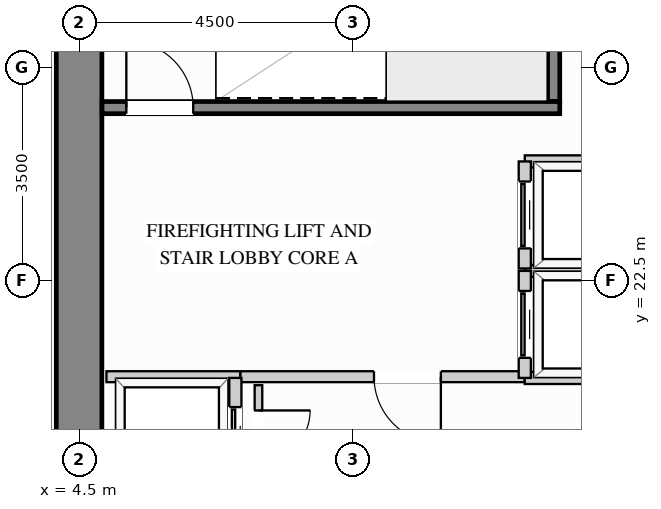
"""IFC4 building model, lengths in metres.
Left out: names, types, materials, properties, quantities, classifications, styles, units other than length and angle.
Written with IfcOpenShell. Run it as: python <this file> out.ifc"""

import sys

from ifc_helpers import new_model, si_unit, direction, frame, frame_2d, origin, place, context, subcontext, project, spatial, rectangle, extrude, source, transform, mapped, element, fill, save


model = new_model("IFC4")
c1 = context("Model", 3, precision=1e-05, world=origin(), true_north=direction((0.0, 1.0)))
c2 = subcontext(c1, "Body", "Model", "MODEL_VIEW")
j1 = project(units=[si_unit("LENGTHUNIT", "METRE"), si_unit("PLANEANGLEUNIT", "RADIAN")], contexts=[c1])
p1 = place(None, origin())
s1 = spatial("IfcSite", under=j1, at=p1, CompositionType="ELEMENT")
p2 = place(p1, origin())
s2 = spatial("IfcBuilding", under=s1, at=p2, CompositionType="ELEMENT")
p3 = place(p2, frame((0.0, 0.0, 77.4)))
s3 = spatial("IfcBuildingStorey", under=s2, at=p3, CompositionType="ELEMENT", Elevation=77.4)
m1 = source(origin(), c2, "Body", "SweptSolid", [
    extrude(rectangle(XDim=20.25, YDim=0.75, at=frame_2d((10.125, 0.0))), origin(), (0.0, 0.0, 1.0), 3.38),
])
p4 = place(p3, frame((4.5, 8.875, 0.0), z_axis=(0.0, 0.0, 1.0), x_axis=(0.0, 1.0, 0.0)))
e1 = element("IfcWall", 1, at=p4, inside=s3, PredefinedType="SHEAR", context=c2, shape_type="MappedRepresentation", body=[
    mapped(m1, transform((0.0, 0.0, 0.0), x_axis=(1.0, 0.0, 0.0), y_axis=(0.0, 1.0, 0.0), z_axis=(0.0, 0.0, 1.0))),
])
p5 = place(p3, frame((7.15, 20.92, 0.0), z_axis=(0.0, 0.0, 1.0), x_axis=(1.0, 0.0, 0.0)))
e2 = element("IfcWall", 2, at=p5, inside=s3, PredefinedType="PARTITIONING", context=c2, shape_type="SweptSolid", body=[
    extrude(rectangle(XDim=4.68, YDim=0.18, at=frame_2d((2.34, 0.0))), origin(), (0.0, 0.0, 1.0), 3.365),
])
p6 = place(p5, frame((2.2, 0.0, 0.0)))
e3 = element("IfcOpeningElement", 3, at=p6, cuts=e2, PredefinedType="OPENING", context=c2, shape_type="SweptSolid", body=[
    extrude(rectangle(XDim=1.1, YDim=2.15, at=frame_2d((0.55, 1.075))), frame((0.0, 0.1, 0.0), z_axis=(0.0, -1.0, 0.0), x_axis=(1.0, 0.0, 0.0)), (0.0, 0.0, 1.0), 0.2),
])
m2 = source(origin(), c2, "Body", "SweptSolid", [
    extrude(rectangle(XDim=2.2, YDim=0.18, at=frame_2d((1.1, 0.0))), origin(), (0.0, 0.0, 1.0), 3.365),
])
p7 = place(p3, frame((4.95, 20.92, 0.0), z_axis=(0.0, 0.0, 1.0), x_axis=(1.0, 0.0, 0.0)))
e4 = element("IfcWall", 4, at=p7, inside=s3, PredefinedType="PARTITIONING", context=c2, shape_type="MappedRepresentation", body=[
    mapped(m2, transform((0.0, 0.0, 0.0), x_axis=(1.0, 0.0, 0.0), y_axis=(0.0, 1.0, 0.0), z_axis=(0.0, 0.0, 1.0))),
])
p8 = place(p3, frame((7.45, 19.2, 0.0), z_axis=(0.0, 0.0, 1.0), x_axis=(0.0, 1.0, 0.0)))
e5 = element("IfcWall", 5, at=p8, inside=s3, PredefinedType="PARTITIONING", context=c2, shape_type="SweptSolid", body=[
    extrude(rectangle(XDim=1.58, YDim=0.125, at=frame_2d((0.79, 0.0))), origin(), (0.0, 0.0, 1.0), 3.365),
])
p9 = place(p8, frame((0.315, 0.0, 0.0)))
e6 = element("IfcOpeningElement", 6, at=p9, cuts=e5, PredefinedType="OPENING", context=c2, shape_type="SweptSolid", body=[
    extrude(rectangle(XDim=0.85, YDim=2.1, at=frame_2d((0.425, 1.05))), frame((0.0, 0.073, 0.0), z_axis=(0.0, -1.0, 0.0), x_axis=(1.0, 0.0, 0.0)), (0.0, 0.0, 1.0), 0.145),
])
m3 = source(origin(), c2, "Body", "SweptSolid", [
    extrude(rectangle(XDim=2.265, YDim=0.2, at=frame_2d((1.132, 0.0))), origin(), (0.0, 0.0, 1.0), 3.365),
])
for number, where, z_axis, x_axis in (
    (7, (11.83, 22.66, 0.0), (0.0, 0.0, 1.0), (1.0, 0.0, 0.0)),
    (8, (11.83, 20.9, 0.0), (0.0, 0.0, 1.0), (1.0, 0.0, 0.0)),
):
    element("IfcWall", number, at=place(p3, frame(where, z_axis=z_axis, x_axis=x_axis)), inside=s3, PredefinedType="PARTITIONING", context=c2, shape_type="MappedRepresentation", body=[
        mapped(m3, transform((0.0, 0.0, 0.0), x_axis=(1.0, 0.0, 0.0), y_axis=(0.0, 1.0, 0.0), z_axis=(0.0, 0.0, 1.0))),
    ])
p10 = place(p3, frame((11.83, 20.9, 0.0), z_axis=(0.0, 0.0, 1.0), x_axis=(0.0, 1.0, 0.0)))
e9 = element("IfcWall", 9, at=p10, inside=s3, PredefinedType="PARTITIONING", context=c2, shape_type="SweptSolid", body=[
    extrude(rectangle(XDim=1.76, YDim=0.2, at=frame_2d((0.88, 0.0))), origin(), (0.0, 0.0, 1.0), 3.365),
])
p11 = place(p10, frame((0.33, 0.0, 0.0)))
e10 = element("IfcOpeningElement", 10, at=p11, cuts=e9, PredefinedType="OPENING", context=c2, shape_type="SweptSolid", body=[
    extrude(rectangle(XDim=1.1, YDim=2.2, at=frame_2d((0.55, 1.1))), frame((0.0, 0.11, 0.0), z_axis=(0.0, -1.0, 0.0), x_axis=(1.0, 0.0, 0.0)), (0.0, 0.0, 1.0), 0.22),
])
p12 = place(p3, frame((11.83, 24.46, 0.0), z_axis=(0.0, 0.0, 1.0), x_axis=(1.0, 0.0, 0.0)))
e11 = element("IfcWall", 11, at=p12, inside=s3, PredefinedType="PARTITIONING", context=c2, shape_type="MappedRepresentation", body=[
    mapped(m3, transform((0.0, 0.0, 0.0), x_axis=(1.0, 0.0, 0.0), y_axis=(0.0, 1.0, 0.0), z_axis=(0.0, 0.0, 1.0))),
])
p13 = place(p3, frame((11.83, 22.7, 0.0), z_axis=(0.0, 0.0, 1.0), x_axis=(0.0, 1.0, 0.0)))
e12 = element("IfcWall", 12, at=p13, inside=s3, PredefinedType="PARTITIONING", context=c2, shape_type="SweptSolid", body=[
    extrude(rectangle(XDim=1.76, YDim=0.2, at=frame_2d((0.88, 0.0))), origin(), (0.0, 0.0, 1.0), 3.365),
])
p14 = place(p13, frame((0.33, 0.0, 0.0)))
e13 = element("IfcOpeningElement", 13, at=p14, cuts=e12, PredefinedType="OPENING", context=c2, shape_type="SweptSolid", body=[
    extrude(rectangle(XDim=1.1, YDim=2.2, at=frame_2d((0.55, 1.1))), frame((0.0, 0.11, 0.0), z_axis=(0.0, -1.0, 0.0), x_axis=(1.0, 0.0, 0.0)), (0.0, 0.0, 1.0), 0.22),
])
p15 = place(p3, frame((7.07, 18.84, 0.0), z_axis=(0.0, 0.0, 1.0), x_axis=(0.0, 1.0, 0.0)))
e14 = element("IfcWall", 14, at=p15, inside=s3, PredefinedType="PARTITIONING", context=c2, shape_type="SweptSolid", body=[
    extrude(rectangle(XDim=2.06, YDim=0.2, at=frame_2d((1.03, 0.0))), origin(), (0.0, 0.0, 1.0), 3.365),
])
p16 = place(p15, frame((0.48, 0.0, 0.0)))
e15 = element("IfcOpeningElement", 15, at=p16, cuts=e14, PredefinedType="OPENING", context=c2, shape_type="SweptSolid", body=[
    extrude(rectangle(XDim=1.1, YDim=2.2, at=frame_2d((0.55, 1.1))), frame((0.0, 0.11, 0.0), z_axis=(0.0, -1.0, 0.0), x_axis=(1.0, 0.0, 0.0)), (0.0, 0.0, 1.0), 0.22),
])
m4 = source(origin(), c2, "Body", "SweptSolid", [
    extrude(rectangle(XDim=3.678, YDim=0.2, at=frame_2d((1.839, 0.0))), origin(), (0.0, 0.0, 1.0), 3.38),
])
p17 = place(p3, frame((12.305, 25.445, 0.0), z_axis=(0.0, 0.0, 1.0), x_axis=(0.0, 1.0, 0.0)))
e16 = element("IfcWall", 16, at=p17, inside=s3, PredefinedType="SHEAR", context=c2, shape_type="MappedRepresentation", body=[
    mapped(m4, transform((0.0, 0.0, 0.0), x_axis=(1.0, 0.0, 0.0), y_axis=(0.0, 1.0, 0.0), z_axis=(0.0, 0.0, 1.0))),
])
p18 = place(p3, frame((4.877, 25.345, 0.0), z_axis=(0.0, 0.0, 1.0), x_axis=(1.0, 0.0, 0.0)))
e17 = element("IfcWall", 17, at=p18, inside=s3, PredefinedType="SHEAR", context=c2, shape_type="SweptSolid", body=[
    extrude(rectangle(XDim=7.528, YDim=0.2, at=frame_2d((3.764, 0.0))), origin(), (0.0, 0.0, 1.0), 3.38),
])
p19 = place(p18, frame((0.4, 0.0, 0.0)))
e18 = element("IfcOpeningElement", 18, at=p19, cuts=e17, PredefinedType="OPENING", context=c2, shape_type="SweptSolid", body=[
    extrude(rectangle(XDim=1.1, YDim=2.15, at=frame_2d((0.55, 1.075))), frame((0.0, 0.11, 0.0), z_axis=(0.0, -1.0, 0.0), x_axis=(1.0, 0.0, 0.0)), (0.0, 0.0, 1.0), 0.22),
])
m5 = source(origin(), c2, "Body", "SweptSolid", [
    extrude(rectangle(XDim=1.1, YDim=2.15, at=frame_2d((0.55, 1.075))), frame((0.0, 0.025, 0.0), z_axis=(0.0, -1.0, 0.0), x_axis=(1.0, 0.0, 0.0)), (0.0, 0.0, 1.0), 0.05),
])
p20 = place(p6, origin())
e19 = element("IfcDoor", 19, at=p20, inside=s3, OperationType="SINGLE_SWING_RIGHT", PredefinedType="DOOR", context=c2, shape_type="MappedRepresentation", body=[
    mapped(m5, transform((0.0, 0.0, 0.0), x_axis=(1.0, 0.0, 0.0), y_axis=(0.0, 1.0, 0.0), z_axis=(0.0, 0.0, 1.0))),
])
fill(e3, e19)
m6 = source(origin(), c2, "Body", "SweptSolid", [
    extrude(rectangle(XDim=1.1, YDim=2.2, at=frame_2d((0.55, 1.1))), frame((0.0, 0.025, 0.0), z_axis=(0.0, -1.0, 0.0), x_axis=(1.0, 0.0, 0.0)), (0.0, 0.0, 1.0), 0.05),
])
p21 = place(p11, origin())
e20 = element("IfcDoor", 20, at=p21, inside=s3, OperationType="SLIDING_TO_LEFT", PredefinedType="DOOR", context=c2, shape_type="MappedRepresentation", body=[
    mapped(m6, transform((0.0, 0.0, 0.0), x_axis=(1.0, 0.0, 0.0), y_axis=(0.0, 1.0, 0.0), z_axis=(0.0, 0.0, 1.0))),
])
fill(e10, e20)
p22 = place(p14, origin())
e21 = element("IfcDoor", 21, at=p22, inside=s3, OperationType="SLIDING_TO_LEFT", PredefinedType="DOOR", context=c2, shape_type="MappedRepresentation", body=[
    mapped(m6, transform((0.0, 0.0, 0.0), x_axis=(1.0, 0.0, 0.0), y_axis=(0.0, 1.0, 0.0), z_axis=(0.0, 0.0, 1.0))),
])
fill(e13, e21)
p23 = place(p16, origin())
e22 = element("IfcDoor", 22, at=p23, inside=s3, OperationType="SLIDING_TO_LEFT", PredefinedType="DOOR", context=c2, shape_type="MappedRepresentation", body=[
    mapped(m6, transform((0.0, 0.0, 0.0), x_axis=(1.0, 0.0, 0.0), y_axis=(0.0, 1.0, 0.0), z_axis=(0.0, 0.0, 1.0))),
])
fill(e15, e22)
m7 = source(origin(), c2, "Body", "SweptSolid", [
    extrude(rectangle(XDim=0.85, YDim=2.1, at=frame_2d((0.425, 1.05))), frame((0.0, 0.025, 0.0), z_axis=(0.0, -1.0, 0.0), x_axis=(1.0, 0.0, 0.0)), (0.0, 0.0, 1.0), 0.05),
])
p24 = place(p9, origin())
e23 = element("IfcDoor", 23, at=p24, inside=s3, OperationType="SINGLE_SWING_RIGHT", PredefinedType="DOOR", context=c2, shape_type="MappedRepresentation", body=[
    mapped(m7, transform((0.0, 0.0, 0.0), x_axis=(1.0, 0.0, 0.0), y_axis=(0.0, 1.0, 0.0), z_axis=(0.0, 0.0, 1.0))),
])
fill(e6, e23)
m8 = source(origin(), c2, "Body", "SweptSolid", [
    extrude(rectangle(XDim=1.1, YDim=2.15, at=frame_2d((0.55, 1.075))), frame((0.0, 0.025, 0.0), z_axis=(0.0, -1.0, 0.0), x_axis=(1.0, 0.0, 0.0)), (0.0, 0.0, 1.0), 0.05),
])
p25 = place(p19, origin())
e24 = element("IfcDoor", 24, at=p25, inside=s3, OperationType="SINGLE_SWING_LEFT", PredefinedType="DOOR", context=c2, shape_type="MappedRepresentation", body=[
    mapped(m8, transform((0.0, 0.0, 0.0), x_axis=(1.0, 0.0, 0.0), y_axis=(0.0, 1.0, 0.0), z_axis=(0.0, 0.0, 1.0))),
])
fill(e18, e24)
save(model, sys.argv[1])
